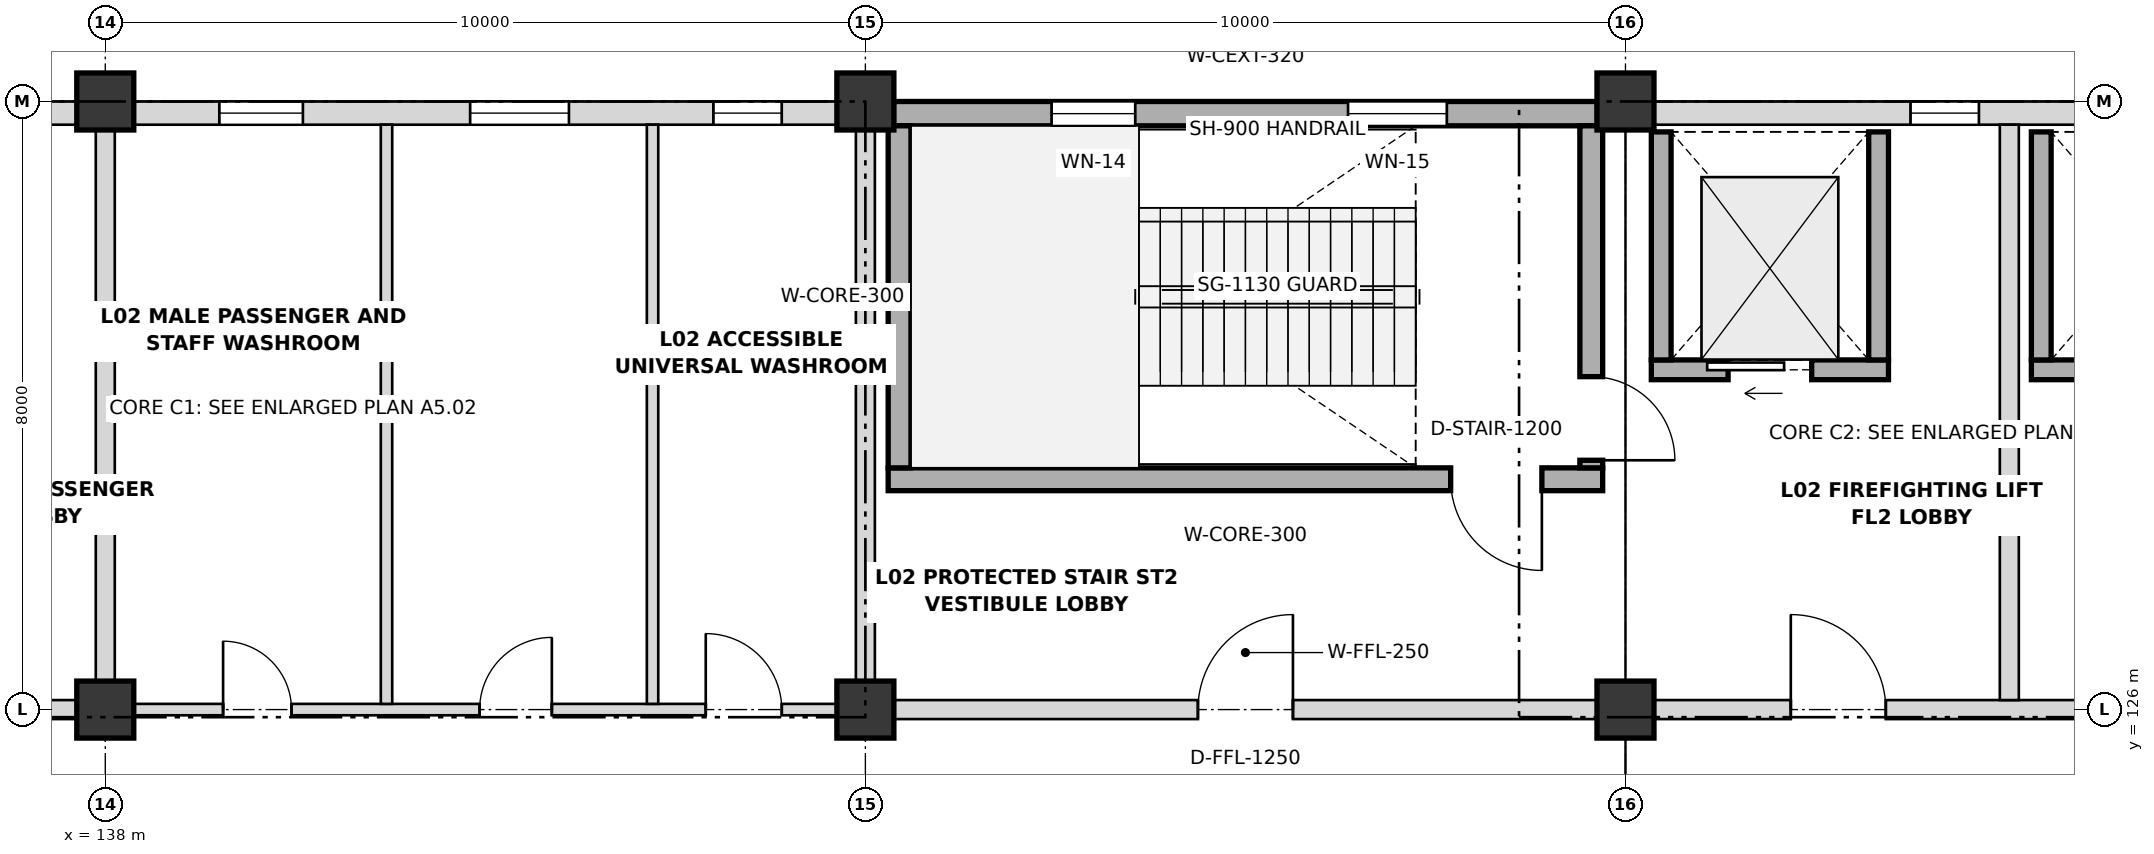
"""IFC4 building model, lengths in metres.
Left out: names, types, materials, properties, quantities, classifications, styles, units other than length and angle.
Written with IfcOpenShell. Run it as: python <this file> out.ifc"""

import sys

from ifc_helpers import new_model, si_unit, direction, frame, frame_2d, origin, origin_2d, place, context, subcontext, project, spatial, rectangle, extrude, element, fill, save


model = new_model("IFC4")
c1 = context("Model", 3, precision=1e-05, world=origin(), true_north=direction((0.0, 1.0)))
c2 = subcontext(c1, "Body", "Model", "MODEL_VIEW")
j1 = project(units=[si_unit("LENGTHUNIT", "METRE"), si_unit("PLANEANGLEUNIT", "RADIAN")], contexts=[c1])
p1 = place(None, origin())
s1 = spatial("IfcSite", under=j1, at=p1, CompositionType="ELEMENT")
p2 = place(p1, origin())
s2 = spatial("IfcBuilding", under=s1, at=p2, CompositionType="ELEMENT")
p3 = place(p2, frame((0.0, 0.0, 9.6)))
s3 = spatial("IfcBuildingStorey", under=s2, at=p3, CompositionType="ELEMENT", Elevation=9.6)
for number, where, z_axis, x_axis in (
    (1, (138.0, 126.0, 0.0), (0.0, 0.0, 1.0), (1.0, 0.0, 0.0)),
    (2, (138.0, 134.0, 0.0), (0.0, 0.0, 1.0), (1.0, 0.0, 0.0)),
    (3, (148.0, 126.0, 0.0), (0.0, 0.0, 1.0), (1.0, 0.0, 0.0)),
    (4, (148.0, 134.0, 0.0), (0.0, 0.0, 1.0), (1.0, 0.0, 0.0)),
    (5, (158.0, 126.0, 0.0), (0.0, 0.0, 1.0), (1.0, 0.0, 0.0)),
    (6, (158.0, 134.0, 0.0), (0.0, 0.0, 1.0), (1.0, 0.0, 0.0)),
):
    element("IfcColumn", number, at=place(p3, frame(where, z_axis=z_axis, x_axis=x_axis)), inside=s3, PredefinedType="COLUMN", context=c2, shape_type="SweptSolid", body=[
        extrude(rectangle(XDim=0.75, YDim=0.75, at=origin_2d()), origin(), (0.0, 0.0, 1.0), 4.8),
    ])
p4 = place(p3, frame((128.37, 133.847, 0.0), z_axis=(0.0, 0.0, 1.0), x_axis=(1.0, 0.0, 0.0)))
e7 = element("IfcWall", 7, at=p4, inside=s3, PredefinedType="SOLIDWALL", context=c2, shape_type="SweptSolid", body=[
    extrude(rectangle(XDim=9.26, YDim=0.305, at=frame_2d((4.63, 0.0))), origin(), (0.0, 0.0, 1.0), 3.758),
])
p5 = place(p4, frame((3.38, 0.0, 1.05)))
e8 = element("IfcOpeningElement", 8, at=p5, cuts=e7, PredefinedType="OPENING", context=c2, shape_type="SweptSolid", body=[
    extrude(rectangle(XDim=0.9, YDim=1.15, at=frame_2d((0.45, 0.575))), frame((0.0, 0.162, 0.0), z_axis=(0.0, -1.0, 0.0), x_axis=(1.0, 0.0, 0.0)), (0.0, 0.0, 1.0), 0.325),
])
p6 = place(p3, frame((138.37, 133.847, 0.0), z_axis=(0.0, 0.0, 1.0), x_axis=(1.0, 0.0, 0.0)))
e9 = element("IfcWall", 9, at=p6, inside=s3, PredefinedType="SOLIDWALL", context=c2, shape_type="SweptSolid", body=[
    extrude(rectangle(XDim=9.26, YDim=0.305, at=frame_2d((4.63, 0.0))), origin(), (0.0, 0.0, 1.0), 3.758),
])
p7 = place(p6, frame((1.13, 0.0, 1.25)))
e10 = element("IfcOpeningElement", 10, at=p7, cuts=e9, PredefinedType="OPENING", context=c2, shape_type="SweptSolid", body=[
    extrude(rectangle(XDim=1.1, YDim=1.15, at=frame_2d((0.55, 0.575))), frame((0.0, 0.162, 0.0), z_axis=(0.0, -1.0, 0.0), x_axis=(1.0, 0.0, 0.0)), (0.0, 0.0, 1.0), 0.325),
])
p8 = place(p6, frame((4.43, 0.0, 1.25)))
e11 = element("IfcOpeningElement", 11, at=p8, cuts=e9, PredefinedType="OPENING", context=c2, shape_type="SweptSolid", body=[
    extrude(rectangle(XDim=1.3, YDim=1.15, at=frame_2d((0.65, 0.575))), frame((0.0, 0.162, 0.0), z_axis=(0.0, -1.0, 0.0), x_axis=(1.0, 0.0, 0.0)), (0.0, 0.0, 1.0), 0.325),
])
p9 = place(p6, frame((7.63, 0.0, 1.25)))
e12 = element("IfcOpeningElement", 12, at=p9, cuts=e9, PredefinedType="OPENING", context=c2, shape_type="SweptSolid", body=[
    extrude(rectangle(XDim=0.9, YDim=1.4, at=frame_2d((0.45, 0.7))), frame((0.0, 0.162, 0.0), z_axis=(0.0, -1.0, 0.0), x_axis=(1.0, 0.0, 0.0)), (0.0, 0.0, 1.0), 0.325),
])
p10 = place(p3, frame((148.37, 133.84, 0.0), z_axis=(0.0, 0.0, 1.0), x_axis=(1.0, 0.0, 0.0)))
e13 = element("IfcWall", 13, at=p10, inside=s3, PredefinedType="SHEAR", context=c2, shape_type="SweptSolid", body=[
    extrude(rectangle(XDim=9.26, YDim=0.32, at=frame_2d((4.63, 0.0))), origin(), (0.0, 0.0, 1.0), 4.8),
])
p11 = place(p10, frame((2.08, 0.0, 1.05)))
e14 = element("IfcOpeningElement", 14, at=p11, cuts=e13, PredefinedType="OPENING", context=c2, shape_type="SweptSolid", body=[
    extrude(rectangle(XDim=1.1, YDim=1.4, at=frame_2d((0.55, 0.7))), frame((0.0, 0.17, 0.0), z_axis=(0.0, -1.0, 0.0), x_axis=(1.0, 0.0, 0.0)), (0.0, 0.0, 1.0), 0.34),
])
p12 = place(p10, frame((5.98, 0.0, 1.05)))
e15 = element("IfcOpeningElement", 15, at=p12, cuts=e13, PredefinedType="OPENING", context=c2, shape_type="SweptSolid", body=[
    extrude(rectangle(XDim=1.3, YDim=1.4, at=frame_2d((0.65, 0.7))), frame((0.0, 0.17, 0.0), z_axis=(0.0, -1.0, 0.0), x_axis=(1.0, 0.0, 0.0)), (0.0, 0.0, 1.0), 0.34),
])
p13 = place(p3, frame((158.37, 133.847, 0.0), z_axis=(0.0, 0.0, 1.0), x_axis=(1.0, 0.0, 0.0)))
e16 = element("IfcWall", 16, at=p13, inside=s3, PredefinedType="SOLIDWALL", context=c2, shape_type="SweptSolid", body=[
    extrude(rectangle(XDim=9.26, YDim=0.305, at=frame_2d((4.63, 0.0))), origin(), (0.0, 0.0, 1.0), 3.758),
])
p14 = place(p13, frame((3.38, 0.0, 1.05)))
e17 = element("IfcOpeningElement", 17, at=p14, cuts=e16, PredefinedType="OPENING", context=c2, shape_type="SweptSolid", body=[
    extrude(rectangle(XDim=0.9, YDim=1.15, at=frame_2d((0.45, 0.575))), frame((0.0, 0.162, 0.0), z_axis=(0.0, -1.0, 0.0), x_axis=(1.0, 0.0, 0.0)), (0.0, 0.0, 1.0), 0.325),
])
p15 = place(p3, frame((157.7, 129.03, 0.0), z_axis=(0.0, 0.0, 1.0), x_axis=(-1.0, 0.0, 0.0)))
e18 = element("IfcWall", 18, at=p15, inside=s3, PredefinedType="SHEAR", context=c2, shape_type="SweptSolid", body=[
    extrude(rectangle(XDim=9.4, YDim=0.3, at=frame_2d((4.7, 0.0))), origin(), (0.0, 0.0, 1.0), 4.8),
])
p16 = place(p15, frame((0.8, 0.0, 0.0)))
e19 = element("IfcOpeningElement", 19, at=p16, cuts=e18, PredefinedType="OPENING", context=c2, shape_type="SweptSolid", body=[
    extrude(rectangle(XDim=1.2, YDim=2.15, at=frame_2d((0.6, 1.075))), frame((0.0, 0.16, 0.0), z_axis=(0.0, -1.0, 0.0), x_axis=(1.0, 0.0, 0.0)), (0.0, 0.0, 1.0), 0.32),
])
p17 = place(p3, frame((157.55, 133.68, 0.0), z_axis=(0.0, 0.0, 1.0), x_axis=(0.0, -1.0, 0.0)))
e20 = element("IfcWall", 20, at=p17, inside=s3, PredefinedType="SHEAR", context=c2, shape_type="SweptSolid", body=[
    extrude(rectangle(XDim=4.5, YDim=0.3, at=frame_2d((2.25, 0.0))), origin(), (0.0, 0.0, 1.0), 4.8),
])
p18 = place(p17, frame((3.3, 0.0, 0.0)))
e21 = element("IfcOpeningElement", 21, at=p18, cuts=e20, PredefinedType="OPENING", context=c2, shape_type="SweptSolid", body=[
    extrude(rectangle(XDim=1.1, YDim=2.15, at=frame_2d((0.55, 1.075))), frame((0.0, 0.16, 0.0), z_axis=(0.0, -1.0, 0.0), x_axis=(1.0, 0.0, 0.0)), (0.0, 0.0, 1.0), 0.32),
])
p19 = place(p3, frame((148.45, 129.18, 0.0), z_axis=(0.0, 0.0, 1.0), x_axis=(0.0, 1.0, 0.0)))
e22 = element("IfcWall", 22, at=p19, inside=s3, PredefinedType="SHEAR", context=c2, shape_type="SweptSolid", body=[
    extrude(rectangle(XDim=4.5, YDim=0.3, at=frame_2d((2.25, 0.0))), origin(), (0.0, 0.0, 1.0), 4.8),
])
p20 = place(p3, frame((158.34, 130.47, 0.0), z_axis=(0.0, 0.0, 1.0), x_axis=(1.0, 0.0, 0.0)))
e23 = element("IfcWall", 23, at=p20, inside=s3, PredefinedType="SHEAR", context=c2, shape_type="SweptSolid", body=[
    extrude(rectangle(XDim=3.12, YDim=0.26, at=frame_2d((1.56, 0.0))), origin(), (0.0, 0.0, 1.0), 4.8),
])
p21 = place(p20, frame((1.01, 0.0, 0.0)))
e24 = element("IfcOpeningElement", 24, at=p21, cuts=e23, PredefinedType="OPENING", context=c2, shape_type="SweptSolid", body=[
    extrude(rectangle(XDim=1.1, YDim=2.1, at=frame_2d((0.55, 1.05))), frame((0.0, 0.14, 0.0), z_axis=(0.0, -1.0, 0.0), x_axis=(1.0, 0.0, 0.0)), (0.0, 0.0, 1.0), 0.28),
])
for number, where, z_axis, x_axis in (
    (25, (158.47, 130.6, 0.0), (0.0, 0.0, 1.0), (0.0, 1.0, 0.0)),
    (26, (161.33, 130.6, 0.0), (0.0, 0.0, 1.0), (0.0, 1.0, 0.0)),
):
    element("IfcWall", number, at=place(p3, frame(where, z_axis=z_axis, x_axis=x_axis)), inside=s3, PredefinedType="SHEAR", context=c2, shape_type="SweptSolid", body=[
        extrude(rectangle(XDim=3.0, YDim=0.26, at=frame_2d((1.5, 0.0))), origin(), (0.0, 0.0, 1.0), 4.8),
    ])
p22 = place(p3, frame((163.34, 130.47, 0.0), z_axis=(0.0, 0.0, 1.0), x_axis=(1.0, 0.0, 0.0)))
e27 = element("IfcWall", 27, at=p22, inside=s3, PredefinedType="SHEAR", context=c2, shape_type="SweptSolid", body=[
    extrude(rectangle(XDim=3.12, YDim=0.26, at=frame_2d((1.56, 0.0))), origin(), (0.0, 0.0, 1.0), 4.8),
])
p23 = place(p22, frame((1.01, 0.0, 0.0)))
e28 = element("IfcOpeningElement", 28, at=p23, cuts=e27, PredefinedType="OPENING", context=c2, shape_type="SweptSolid", body=[
    extrude(rectangle(XDim=1.1, YDim=2.15, at=frame_2d((0.55, 1.075))), frame((0.0, 0.14, 0.0), z_axis=(0.0, -1.0, 0.0), x_axis=(1.0, 0.0, 0.0)), (0.0, 0.0, 1.0), 0.28),
])
p24 = place(p3, frame((163.47, 130.6, 0.0), z_axis=(0.0, 0.0, 1.0), x_axis=(0.0, 1.0, 0.0)))
e29 = element("IfcWall", 29, at=p24, inside=s3, PredefinedType="SHEAR", context=c2, shape_type="SweptSolid", body=[
    extrude(rectangle(XDim=3.0, YDim=0.26, at=frame_2d((1.5, 0.0))), origin(), (0.0, 0.0, 1.0), 4.8),
])
p25 = place(p3, frame((128.38, 126.0, 0.0), z_axis=(0.0, 0.0, 1.0), x_axis=(1.0, 0.0, 0.0)))
e30 = element("IfcWall", 30, at=p25, inside=s3, PredefinedType="PARTITIONING", context=c2, shape_type="SweptSolid", body=[
    extrude(rectangle(XDim=9.24, YDim=0.25, at=frame_2d((4.62, 0.0))), origin(), (0.0, 0.0, 1.0), 3.658),
])
p26 = place(p25, frame((1.795, 0.0, 0.0)))
e31 = element("IfcOpeningElement", 31, at=p26, cuts=e30, PredefinedType="OPENING", context=c2, shape_type="SweptSolid", body=[
    extrude(rectangle(XDim=1.25, YDim=2.15, at=frame_2d((0.625, 1.075))), frame((0.0, 0.135, 0.0), z_axis=(0.0, -1.0, 0.0), x_axis=(1.0, 0.0, 0.0)), (0.0, 0.0, 1.0), 0.27),
])
p27 = place(p25, frame((6.27, 0.0, 0.0)))
e32 = element("IfcOpeningElement", 32, at=p27, cuts=e30, PredefinedType="OPENING", context=c2, shape_type="SweptSolid", body=[
    extrude(rectangle(XDim=1.1, YDim=2.15, at=frame_2d((0.55, 1.075))), frame((0.0, 0.135, 0.0), z_axis=(0.0, -1.0, 0.0), x_axis=(1.0, 0.0, 0.0)), (0.0, 0.0, 1.0), 0.27),
])
p28 = place(p3, frame((138.38, 126.0, 0.0), z_axis=(0.0, 0.0, 1.0), x_axis=(1.0, 0.0, 0.0)))
e33 = element("IfcWall", 33, at=p28, inside=s3, PredefinedType="PARTITIONING", context=c2, shape_type="SweptSolid", body=[
    extrude(rectangle(XDim=9.24, YDim=0.15, at=frame_2d((4.62, 0.0))), origin(), (0.0, 0.0, 1.0), 3.658),
])
p29 = place(p28, frame((1.17, 0.0, 0.0)))
e34 = element("IfcOpeningElement", 34, at=p29, cuts=e33, PredefinedType="OPENING", context=c2, shape_type="SweptSolid", body=[
    extrude(rectangle(XDim=0.9, YDim=2.05, at=frame_2d((0.45, 1.025))), frame((0.0, 0.085, 0.0), z_axis=(0.0, -1.0, 0.0), x_axis=(1.0, 0.0, 0.0)), (0.0, 0.0, 1.0), 0.17),
])
p30 = place(p28, frame((4.545, 0.0, 0.0)))
e35 = element("IfcOpeningElement", 35, at=p30, cuts=e33, PredefinedType="OPENING", context=c2, shape_type="SweptSolid", body=[
    extrude(rectangle(XDim=0.95, YDim=2.05, at=frame_2d((0.475, 1.025))), frame((0.0, 0.085, 0.0), z_axis=(0.0, -1.0, 0.0), x_axis=(1.0, 0.0, 0.0)), (0.0, 0.0, 1.0), 0.17),
])
p31 = place(p28, frame((7.52, 0.0, 0.0)))
e36 = element("IfcOpeningElement", 36, at=p31, cuts=e33, PredefinedType="OPENING", context=c2, shape_type="SweptSolid", body=[
    extrude(rectangle(XDim=1.0, YDim=2.05, at=frame_2d((0.5, 1.025))), frame((0.0, 0.085, 0.0), z_axis=(0.0, -1.0, 0.0), x_axis=(1.0, 0.0, 0.0)), (0.0, 0.0, 1.0), 0.17),
])
p32 = place(p3, frame((148.38, 126.0, 0.0), z_axis=(0.0, 0.0, 1.0), x_axis=(1.0, 0.0, 0.0)))
e37 = element("IfcWall", 37, at=p32, inside=s3, PredefinedType="PARTITIONING", context=c2, shape_type="SweptSolid", body=[
    extrude(rectangle(XDim=9.24, YDim=0.25, at=frame_2d((4.62, 0.0))), origin(), (0.0, 0.0, 1.0), 3.658),
])
p33 = place(p32, frame((3.995, 0.0, 0.0)))
e38 = element("IfcOpeningElement", 38, at=p33, cuts=e37, PredefinedType="OPENING", context=c2, shape_type="SweptSolid", body=[
    extrude(rectangle(XDim=1.25, YDim=2.15, at=frame_2d((0.625, 1.075))), frame((0.0, 0.135, 0.0), z_axis=(0.0, -1.0, 0.0), x_axis=(1.0, 0.0, 0.0)), (0.0, 0.0, 1.0), 0.27),
])
p34 = place(p3, frame((158.38, 126.0, 0.0), z_axis=(0.0, 0.0, 1.0), x_axis=(1.0, 0.0, 0.0)))
e39 = element("IfcWall", 39, at=p34, inside=s3, PredefinedType="PARTITIONING", context=c2, shape_type="SweptSolid", body=[
    extrude(rectangle(XDim=9.24, YDim=0.25, at=frame_2d((4.62, 0.0))), origin(), (0.0, 0.0, 1.0), 3.658),
])
p35 = place(p34, frame((1.795, 0.0, 0.0)))
e40 = element("IfcOpeningElement", 40, at=p35, cuts=e39, PredefinedType="OPENING", context=c2, shape_type="SweptSolid", body=[
    extrude(rectangle(XDim=1.25, YDim=2.15, at=frame_2d((0.625, 1.075))), frame((0.0, 0.135, 0.0), z_axis=(0.0, -1.0, 0.0), x_axis=(1.0, 0.0, 0.0)), (0.0, 0.0, 1.0), 0.27),
])
p36 = place(p34, frame((6.27, 0.0, 0.0)))
e41 = element("IfcOpeningElement", 41, at=p36, cuts=e39, PredefinedType="OPENING", context=c2, shape_type="SweptSolid", body=[
    extrude(rectangle(XDim=1.1, YDim=2.15, at=frame_2d((0.55, 1.075))), frame((0.0, 0.135, 0.0), z_axis=(0.0, -1.0, 0.0), x_axis=(1.0, 0.0, 0.0)), (0.0, 0.0, 1.0), 0.27),
])
p37 = place(p3, frame((163.05, 126.125, 0.0), z_axis=(0.0, 0.0, 1.0), x_axis=(0.0, 1.0, 0.0)))
e42 = element("IfcWall", 42, at=p37, inside=s3, PredefinedType="PARTITIONING", context=c2, shape_type="SweptSolid", body=[
    extrude(rectangle(XDim=7.57, YDim=0.25, at=frame_2d((3.785, 0.0))), origin(), (0.0, 0.0, 1.0), 3.658),
])
for number, where, z_axis, x_axis in (
    (43, (141.7, 126.075, 0.0), (0.0, 0.0, 1.0), (0.0, 1.0, 0.0)),
    (44, (145.2, 126.075, 0.0), (0.0, 0.0, 1.0), (0.0, 1.0, 0.0)),
):
    element("IfcWall", number, at=place(p3, frame(where, z_axis=z_axis, x_axis=x_axis)), inside=s3, PredefinedType="PARTITIONING", context=c2, shape_type="SweptSolid", body=[
        extrude(rectangle(XDim=7.62, YDim=0.15, at=frame_2d((3.81, 0.0))), origin(), (0.0, 0.0, 1.0), 3.658),
    ])
for number, where, z_axis, x_axis in (
    (45, (138.0, 126.38, 0.0), (0.0, 0.0, 1.0), (0.0, 1.0, 0.0)),
    (46, (148.0, 126.38, 0.0), (0.0, 0.0, 1.0), (0.0, 1.0, 0.0)),
):
    element("IfcWall", number, at=place(p3, frame(where, z_axis=z_axis, x_axis=x_axis)), inside=s3, PredefinedType="PARTITIONING", context=c2, shape_type="SweptSolid", body=[
        extrude(rectangle(XDim=7.24, YDim=0.25, at=frame_2d((3.62, 0.0))), origin(), (0.0, 0.0, 1.0), 3.758),
    ])
p38 = place(p7, origin())
e47 = element("IfcWindow", 47, at=p38, inside=s3, PartitioningType="SINGLE_PANEL", PredefinedType="WINDOW", context=c2, shape_type="SweptSolid", body=[
    extrude(rectangle(XDim=1.1, YDim=1.15, at=frame_2d((0.55, 0.575))), frame((0.0, 0.03, 0.0), z_axis=(0.0, -1.0, 0.0), x_axis=(1.0, 0.0, 0.0)), (0.0, 0.0, 1.0), 0.06),
])
fill(e10, e47)
p39 = place(p8, origin())
e48 = element("IfcWindow", 48, at=p39, inside=s3, PartitioningType="SINGLE_PANEL", PredefinedType="WINDOW", context=c2, shape_type="SweptSolid", body=[
    extrude(rectangle(XDim=1.3, YDim=1.15, at=frame_2d((0.65, 0.575))), frame((0.0, 0.03, 0.0), z_axis=(0.0, -1.0, 0.0), x_axis=(1.0, 0.0, 0.0)), (0.0, 0.0, 1.0), 0.06),
])
fill(e11, e48)
p40 = place(p9, origin())
e49 = element("IfcWindow", 49, at=p40, inside=s3, PartitioningType="SINGLE_PANEL", PredefinedType="WINDOW", context=c2, shape_type="SweptSolid", body=[
    extrude(rectangle(XDim=0.9, YDim=1.4, at=frame_2d((0.45, 0.7))), frame((0.0, 0.03, 0.0), z_axis=(0.0, -1.0, 0.0), x_axis=(1.0, 0.0, 0.0)), (0.0, 0.0, 1.0), 0.06),
])
fill(e12, e49)
p41 = place(p11, origin())
e50 = element("IfcWindow", 50, at=p41, inside=s3, PartitioningType="SINGLE_PANEL", PredefinedType="WINDOW", context=c2, shape_type="SweptSolid", body=[
    extrude(rectangle(XDim=1.1, YDim=1.4, at=frame_2d((0.55, 0.7))), frame((0.0, 0.03, 0.0), z_axis=(0.0, -1.0, 0.0), x_axis=(1.0, 0.0, 0.0)), (0.0, 0.0, 1.0), 0.06),
])
fill(e14, e50)
p42 = place(p12, origin())
e51 = element("IfcWindow", 51, at=p42, inside=s3, PartitioningType="SINGLE_PANEL", PredefinedType="WINDOW", context=c2, shape_type="SweptSolid", body=[
    extrude(rectangle(XDim=1.3, YDim=1.4, at=frame_2d((0.65, 0.7))), frame((0.0, 0.03, 0.0), z_axis=(0.0, -1.0, 0.0), x_axis=(1.0, 0.0, 0.0)), (0.0, 0.0, 1.0), 0.06),
])
fill(e15, e51)
p43 = place(p14, origin())
e52 = element("IfcWindow", 52, at=p43, inside=s3, PartitioningType="SINGLE_PANEL", PredefinedType="WINDOW", context=c2, shape_type="SweptSolid", body=[
    extrude(rectangle(XDim=0.9, YDim=1.15, at=frame_2d((0.45, 0.575))), frame((0.0, 0.03, 0.0), z_axis=(0.0, -1.0, 0.0), x_axis=(1.0, 0.0, 0.0)), (0.0, 0.0, 1.0), 0.06),
])
fill(e17, e52)
p44 = place(p16, origin())
e53 = element("IfcDoor", 53, at=p44, inside=s3, OperationType="SINGLE_SWING_LEFT", PredefinedType="DOOR", context=c2, shape_type="SweptSolid", body=[
    extrude(rectangle(XDim=1.2, YDim=2.15, at=frame_2d((0.6, 1.075))), frame((0.0, 0.025, 0.0), z_axis=(0.0, -1.0, 0.0), x_axis=(1.0, 0.0, 0.0)), (0.0, 0.0, 1.0), 0.05),
])
fill(e19, e53)
p45 = place(p18, origin())
e54 = element("IfcDoor", 54, at=p45, inside=s3, OperationType="SINGLE_SWING_RIGHT", PredefinedType="DOOR", context=c2, shape_type="SweptSolid", body=[
    extrude(rectangle(XDim=1.1, YDim=2.15, at=frame_2d((0.55, 1.075))), frame((0.0, 0.025, 0.0), z_axis=(0.0, -1.0, 0.0), x_axis=(1.0, 0.0, 0.0)), (0.0, 0.0, 1.0), 0.05),
])
fill(e21, e54)
p46 = place(p21, origin())
e55 = element("IfcDoor", 55, at=p46, inside=s3, OperationType="SLIDING_TO_LEFT", PredefinedType="DOOR", context=c2, shape_type="SweptSolid", body=[
    extrude(rectangle(XDim=1.1, YDim=2.1, at=frame_2d((0.55, 1.05))), frame((0.0, 0.025, 0.0), z_axis=(0.0, -1.0, 0.0), x_axis=(1.0, 0.0, 0.0)), (0.0, 0.0, 1.0), 0.05),
])
fill(e24, e55)
p47 = place(p29, origin())
e56 = element("IfcDoor", 56, at=p47, inside=s3, OperationType="SINGLE_SWING_LEFT", PredefinedType="DOOR", context=c2, shape_type="SweptSolid", body=[
    extrude(rectangle(XDim=0.9, YDim=2.05, at=frame_2d((0.45, 1.025))), frame((0.0, 0.025, 0.0), z_axis=(0.0, -1.0, 0.0), x_axis=(1.0, 0.0, 0.0)), (0.0, 0.0, 1.0), 0.05),
])
fill(e34, e56)
p48 = place(p30, origin())
e57 = element("IfcDoor", 57, at=p48, inside=s3, OperationType="SINGLE_SWING_RIGHT", PredefinedType="DOOR", context=c2, shape_type="SweptSolid", body=[
    extrude(rectangle(XDim=0.95, YDim=2.05, at=frame_2d((0.475, 1.025))), frame((0.0, 0.025, 0.0), z_axis=(0.0, -1.0, 0.0), x_axis=(1.0, 0.0, 0.0)), (0.0, 0.0, 1.0), 0.05),
])
fill(e35, e57)
p49 = place(p31, origin())
e58 = element("IfcDoor", 58, at=p49, inside=s3, OperationType="SINGLE_SWING_LEFT", PredefinedType="DOOR", context=c2, shape_type="SweptSolid", body=[
    extrude(rectangle(XDim=1.0, YDim=2.05, at=frame_2d((0.5, 1.025))), frame((0.0, 0.025, 0.0), z_axis=(0.0, -1.0, 0.0), x_axis=(1.0, 0.0, 0.0)), (0.0, 0.0, 1.0), 0.05),
])
fill(e36, e58)
p50 = place(p33, origin())
e59 = element("IfcDoor", 59, at=p50, inside=s3, OperationType="SINGLE_SWING_RIGHT", PredefinedType="DOOR", context=c2, shape_type="SweptSolid", body=[
    extrude(rectangle(XDim=1.25, YDim=2.15, at=frame_2d((0.625, 1.075))), frame((0.0, 0.025, 0.0), z_axis=(0.0, -1.0, 0.0), x_axis=(1.0, 0.0, 0.0)), (0.0, 0.0, 1.0), 0.05),
])
fill(e38, e59)
p51 = place(p35, origin())
e60 = element("IfcDoor", 60, at=p51, inside=s3, OperationType="SINGLE_SWING_LEFT", PredefinedType="DOOR", context=c2, shape_type="SweptSolid", body=[
    extrude(rectangle(XDim=1.25, YDim=2.15, at=frame_2d((0.625, 1.075))), frame((0.0, 0.025, 0.0), z_axis=(0.0, -1.0, 0.0), x_axis=(1.0, 0.0, 0.0)), (0.0, 0.0, 1.0), 0.05),
])
fill(e40, e60)
save(model, sys.argv[1])
